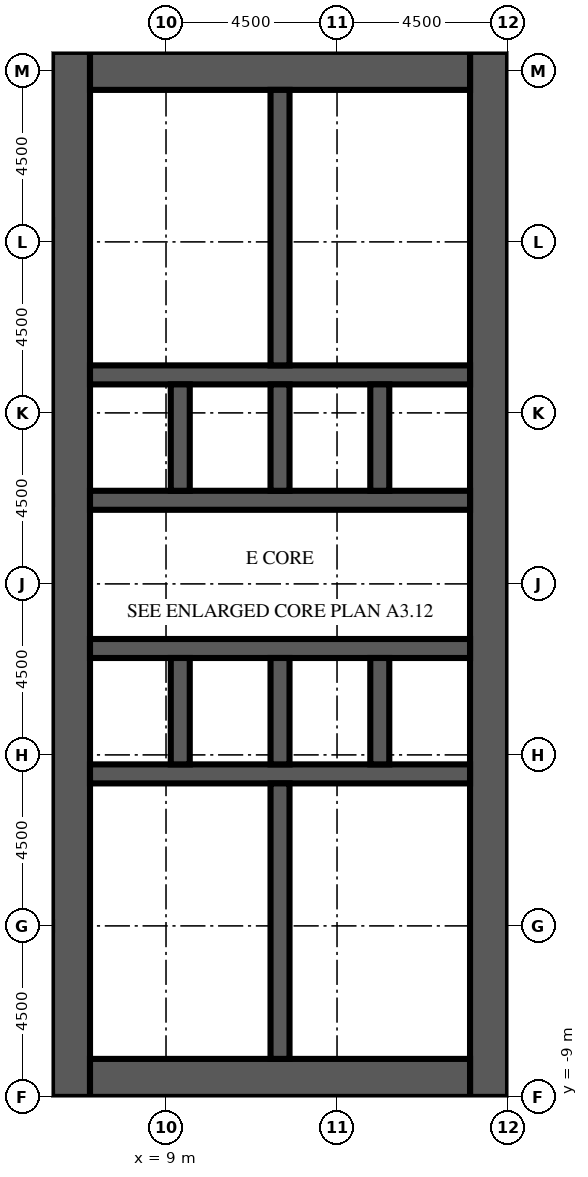
"""IFC4 building model, lengths in metres.
Left out: names, types, materials, properties, quantities, classifications, styles, units other than length and angle.
Written with IfcOpenShell. Run it as: python <this file> out.ifc"""

import sys

from ifc_helpers import new_model, si_unit, direction, frame, frame_2d, origin, place, context, subcontext, project, spatial, rectangle, extrude, element, fill, save


model = new_model("IFC4")
c1 = context("Model", 3, precision=1e-05, world=origin(), true_north=direction((0.0, 1.0)))
c2 = subcontext(c1, "Body", "Model", "MODEL_VIEW")
j1 = project(units=[si_unit("LENGTHUNIT", "METRE"), si_unit("PLANEANGLEUNIT", "RADIAN")], contexts=[c1])
p1 = place(None, origin())
s1 = spatial("IfcSite", under=j1, at=p1, CompositionType="ELEMENT")
p2 = place(p1, origin())
s2 = spatial("IfcBuilding", under=s1, at=p2, CompositionType="ELEMENT")
p3 = place(p2, frame((0.0, 0.0, 70.6)))
s3 = spatial("IfcBuildingStorey", under=s2, at=p3, CompositionType="ELEMENT", Elevation=70.6)
p4 = place(p3, frame((6.5, -9.0, 0.0), z_axis=(0.0, 0.0, 1.0), x_axis=(0.0, 1.0, 0.0)))
e1 = element("IfcWall", 1, at=p4, inside=s3, PredefinedType="SHEAR", context=c2, shape_type="SweptSolid", body=[
    extrude(rectangle(XDim=27.5, YDim=1.0, at=frame_2d((13.75, 0.0))), origin(), (0.0, 0.0, 1.0), 6.0),
])
p5 = place(p4, frame((12.55, 0.0, 0.0)))
e2 = element("IfcOpeningElement", 2, at=p5, cuts=e1, PredefinedType="OPENING", context=c2, shape_type="SweptSolid", body=[
    extrude(rectangle(XDim=2.4, YDim=2.4, at=frame_2d((1.2, 1.2))), frame((0.0, 0.51, 0.0), z_axis=(0.0, -1.0, 0.0), x_axis=(1.0, 0.0, 0.0)), (0.0, 0.0, 1.0), 1.02),
])
p6 = place(p4, frame((5.475, 0.0, 0.0)))
e3 = element("IfcOpeningElement", 3, at=p6, cuts=e1, PredefinedType="OPENING", context=c2, shape_type="SweptSolid", body=[
    extrude(rectangle(XDim=1.2, YDim=2.1, at=frame_2d((0.6, 1.05))), frame((0.0, 0.51, 0.0), z_axis=(0.0, -1.0, 0.0), x_axis=(1.0, 0.0, 0.0)), (0.0, 0.0, 1.0), 1.02),
])
p7 = place(p4, frame((19.475, 0.0, 0.0)))
e4 = element("IfcOpeningElement", 4, at=p7, cuts=e1, PredefinedType="OPENING", context=c2, shape_type="SweptSolid", body=[
    extrude(rectangle(XDim=1.0, YDim=2.1, at=frame_2d((0.5, 1.05))), frame((0.0, 0.51, 0.0), z_axis=(0.0, -1.0, 0.0), x_axis=(1.0, 0.0, 0.0)), (0.0, 0.0, 1.0), 1.02),
])
p8 = place(p4, frame((21.106, 0.0, 0.0)))
e5 = element("IfcOpeningElement", 5, at=p8, cuts=e1, PredefinedType="OPENING", context=c2, shape_type="SweptSolid", body=[
    extrude(rectangle(XDim=1.0, YDim=2.1, at=frame_2d((0.5, 1.05))), frame((0.0, 0.51, 0.0), z_axis=(0.0, -1.0, 0.0), x_axis=(1.0, 0.0, 0.0)), (0.0, 0.0, 1.0), 1.02),
])
p9 = place(p4, frame((23.1, 0.0, 0.0)))
e6 = element("IfcOpeningElement", 6, at=p9, cuts=e1, PredefinedType="OPENING", context=c2, shape_type="SweptSolid", body=[
    extrude(rectangle(XDim=1.0, YDim=2.1, at=frame_2d((0.5, 1.05))), frame((0.0, 0.51, 0.0), z_axis=(0.0, -1.0, 0.0), x_axis=(1.0, 0.0, 0.0)), (0.0, 0.0, 1.0), 1.02),
])
p10 = place(p4, frame((25.094, 0.0, 0.0)))
e7 = element("IfcOpeningElement", 7, at=p10, cuts=e1, PredefinedType="OPENING", context=c2, shape_type="SweptSolid", body=[
    extrude(rectangle(XDim=1.0, YDim=2.1, at=frame_2d((0.5, 1.05))), frame((0.0, 0.51, 0.0), z_axis=(0.0, -1.0, 0.0), x_axis=(1.0, 0.0, 0.0)), (0.0, 0.0, 1.0), 1.02),
])
p11 = place(p3, frame((17.5, -9.0, 0.0), z_axis=(0.0, 0.0, 1.0), x_axis=(0.0, 1.0, 0.0)))
e8 = element("IfcWall", 8, at=p11, inside=s3, PredefinedType="SHEAR", context=c2, shape_type="SweptSolid", body=[
    extrude(rectangle(XDim=27.5, YDim=1.0, at=frame_2d((13.75, 0.0))), origin(), (0.0, 0.0, 1.0), 6.0),
])
p12 = place(p11, frame((12.55, 0.0, 0.0)))
e9 = element("IfcOpeningElement", 9, at=p12, cuts=e8, PredefinedType="OPENING", context=c2, shape_type="SweptSolid", body=[
    extrude(rectangle(XDim=2.4, YDim=2.4, at=frame_2d((1.2, 1.2))), frame((0.0, 0.51, 0.0), z_axis=(0.0, -1.0, 0.0), x_axis=(1.0, 0.0, 0.0)), (0.0, 0.0, 1.0), 1.02),
])
p13 = place(p11, frame((6.825, 0.0, 0.0)))
e10 = element("IfcOpeningElement", 10, at=p13, cuts=e8, PredefinedType="OPENING", context=c2, shape_type="SweptSolid", body=[
    extrude(rectangle(XDim=1.2, YDim=2.1, at=frame_2d((0.6, 1.05))), frame((0.0, 0.51, 0.0), z_axis=(0.0, -1.0, 0.0), x_axis=(1.0, 0.0, 0.0)), (0.0, 0.0, 1.0), 1.02),
])
p14 = place(p11, frame((19.475, 0.0, 0.0)))
e11 = element("IfcOpeningElement", 11, at=p14, cuts=e8, PredefinedType="OPENING", context=c2, shape_type="SweptSolid", body=[
    extrude(rectangle(XDim=1.2, YDim=2.1, at=frame_2d((0.6, 1.05))), frame((0.0, 0.51, 0.0), z_axis=(0.0, -1.0, 0.0), x_axis=(1.0, 0.0, 0.0)), (0.0, 0.0, 1.0), 1.02),
])
for number, where, z_axis, x_axis in (
    (12, (7.0, -8.5, 0.0), (0.0, 0.0, 1.0), (1.0, 0.0, 0.0)),
    (13, (7.0, 18.0, 0.0), (0.0, 0.0, 1.0), (1.0, 0.0, 0.0)),
):
    element("IfcWall", number, at=place(p3, frame(where, z_axis=z_axis, x_axis=x_axis)), inside=s3, PredefinedType="SHEAR", context=c2, shape_type="SweptSolid", body=[
        extrude(rectangle(XDim=10.0, YDim=1.0, at=frame_2d((5.0, 0.0))), origin(), (0.0, 0.0, 1.0), 6.0),
    ])
p15 = place(p3, frame((7.0, -0.5, 0.0), z_axis=(0.0, 0.0, 1.0), x_axis=(1.0, 0.0, 0.0)))
e14 = element("IfcWall", 14, at=p15, inside=s3, PredefinedType="SHEAR", context=c2, shape_type="SweptSolid", body=[
    extrude(rectangle(XDim=10.0, YDim=0.5, at=frame_2d((5.0, 0.0))), origin(), (0.0, 0.0, 1.0), 6.0),
])
p16 = place(p3, frame((7.0, 2.8, 0.0), z_axis=(0.0, 0.0, 1.0), x_axis=(1.0, 0.0, 0.0)))
e15 = element("IfcWall", 15, at=p16, inside=s3, PredefinedType="SHEAR", context=c2, shape_type="SweptSolid", body=[
    extrude(rectangle(XDim=10.0, YDim=0.5, at=frame_2d((5.0, 0.0))), origin(), (0.0, 0.0, 1.0), 6.0),
])
p17 = place(p16, frame((0.512, 0.0, 0.0)))
e16 = element("IfcOpeningElement", 16, at=p17, cuts=e15, PredefinedType="OPENING", context=c2, shape_type="SweptSolid", body=[
    extrude(rectangle(XDim=1.1, YDim=2.1, at=frame_2d((0.55, 1.05))), frame((0.0, 0.26, 0.0), z_axis=(0.0, -1.0, 0.0), x_axis=(1.0, 0.0, 0.0)), (0.0, 0.0, 1.0), 0.52),
])
p18 = place(p16, frame((3.137, 0.0, 0.0)))
e17 = element("IfcOpeningElement", 17, at=p18, cuts=e15, PredefinedType="OPENING", context=c2, shape_type="SweptSolid", body=[
    extrude(rectangle(XDim=1.1, YDim=2.1, at=frame_2d((0.55, 1.05))), frame((0.0, 0.26, 0.0), z_axis=(0.0, -1.0, 0.0), x_axis=(1.0, 0.0, 0.0)), (0.0, 0.0, 1.0), 0.52),
])
p19 = place(p16, frame((8.387, 0.0, 0.0)))
e18 = element("IfcOpeningElement", 18, at=p19, cuts=e15, PredefinedType="OPENING", context=c2, shape_type="SweptSolid", body=[
    extrude(rectangle(XDim=1.1, YDim=2.1, at=frame_2d((0.55, 1.05))), frame((0.0, 0.26, 0.0), z_axis=(0.0, -1.0, 0.0), x_axis=(1.0, 0.0, 0.0)), (0.0, 0.0, 1.0), 0.52),
])
p20 = place(p3, frame((7.0, 6.7, 0.0), z_axis=(0.0, 0.0, 1.0), x_axis=(1.0, 0.0, 0.0)))
e19 = element("IfcWall", 19, at=p20, inside=s3, PredefinedType="SHEAR", context=c2, shape_type="SweptSolid", body=[
    extrude(rectangle(XDim=10.0, YDim=0.5, at=frame_2d((5.0, 0.0))), origin(), (0.0, 0.0, 1.0), 6.0),
])
p21 = place(p20, frame((0.512, 0.0, 0.0)))
e20 = element("IfcOpeningElement", 20, at=p21, cuts=e19, PredefinedType="OPENING", context=c2, shape_type="SweptSolid", body=[
    extrude(rectangle(XDim=1.1, YDim=2.1, at=frame_2d((0.55, 1.05))), frame((0.0, 0.26, 0.0), z_axis=(0.0, -1.0, 0.0), x_axis=(1.0, 0.0, 0.0)), (0.0, 0.0, 1.0), 0.52),
])
p22 = place(p20, frame((3.188, 0.0, 0.0)))
e21 = element("IfcOpeningElement", 21, at=p22, cuts=e19, PredefinedType="OPENING", context=c2, shape_type="SweptSolid", body=[
    extrude(rectangle(XDim=1.0, YDim=2.1, at=frame_2d((0.5, 1.05))), frame((0.0, 0.26, 0.0), z_axis=(0.0, -1.0, 0.0), x_axis=(1.0, 0.0, 0.0)), (0.0, 0.0, 1.0), 0.52),
])
p23 = place(p20, frame((5.812, 0.0, 0.0)))
e22 = element("IfcOpeningElement", 22, at=p23, cuts=e19, PredefinedType="OPENING", context=c2, shape_type="SweptSolid", body=[
    extrude(rectangle(XDim=1.0, YDim=2.1, at=frame_2d((0.5, 1.05))), frame((0.0, 0.26, 0.0), z_axis=(0.0, -1.0, 0.0), x_axis=(1.0, 0.0, 0.0)), (0.0, 0.0, 1.0), 0.52),
])
p24 = place(p20, frame((8.438, 0.0, 0.0)))
e23 = element("IfcOpeningElement", 23, at=p24, cuts=e19, PredefinedType="OPENING", context=c2, shape_type="SweptSolid", body=[
    extrude(rectangle(XDim=1.0, YDim=2.1, at=frame_2d((0.5, 1.05))), frame((0.0, 0.26, 0.0), z_axis=(0.0, -1.0, 0.0), x_axis=(1.0, 0.0, 0.0)), (0.0, 0.0, 1.0), 0.52),
])
p25 = place(p3, frame((7.0, 10.0, 0.0), z_axis=(0.0, 0.0, 1.0), x_axis=(1.0, 0.0, 0.0)))
e24 = element("IfcWall", 24, at=p25, inside=s3, PredefinedType="SHEAR", context=c2, shape_type="SweptSolid", body=[
    extrude(rectangle(XDim=10.0, YDim=0.5, at=frame_2d((5.0, 0.0))), origin(), (0.0, 0.0, 1.0), 6.0),
])
for number, where, z_axis, x_axis in (
    (25, (9.375, -0.25, 0.0), (0.0, 0.0, 1.0), (0.0, 1.0, 0.0)),
    (26, (9.375, 6.95, 0.0), (0.0, 0.0, 1.0), (0.0, 1.0, 0.0)),
    (27, (12.0, -0.25, 0.0), (0.0, 0.0, 1.0), (0.0, 1.0, 0.0)),
    (28, (12.0, 6.95, 0.0), (0.0, 0.0, 1.0), (0.0, 1.0, 0.0)),
    (29, (14.625, -0.25, 0.0), (0.0, 0.0, 1.0), (0.0, 1.0, 0.0)),
    (30, (14.625, 6.95, 0.0), (0.0, 0.0, 1.0), (0.0, 1.0, 0.0)),
):
    element("IfcWall", number, at=place(p3, frame(where, z_axis=z_axis, x_axis=x_axis)), inside=s3, PredefinedType="SHEAR", context=c2, shape_type="SweptSolid", body=[
        extrude(rectangle(XDim=2.8, YDim=0.5, at=frame_2d((1.4, 0.0))), origin(), (0.0, 0.0, 1.0), 6.0),
    ])
for number, where, z_axis, x_axis in (
    (31, (12.0, -8.0, 0.0), (0.0, 0.0, 1.0), (0.0, 1.0, 0.0)),
    (32, (12.0, 10.25, 0.0), (0.0, 0.0, 1.0), (0.0, 1.0, 0.0)),
):
    element("IfcWall", number, at=place(p3, frame(where, z_axis=z_axis, x_axis=x_axis)), inside=s3, PredefinedType="SHEAR", context=c2, shape_type="SweptSolid", body=[
        extrude(rectangle(XDim=7.25, YDim=0.5, at=frame_2d((3.625, 0.0))), origin(), (0.0, 0.0, 1.0), 6.0),
    ])
p26 = place(p3, frame((7.0, -5.1, 0.0), z_axis=(0.0, 0.0, 1.0), x_axis=(1.0, 0.0, 0.0)))
e33 = element("IfcWall", 33, at=p26, inside=s3, PredefinedType="PARTITIONING", context=c2, shape_type="SweptSolid", body=[
    extrude(rectangle(XDim=1.5, YDim=0.1, at=frame_2d((0.75, 0.0))), origin(), (0.0, 0.0, 1.0), 5.4),
])
p27 = place(p26, frame((0.25, 0.0, 0.0)))
e34 = element("IfcOpeningElement", 34, at=p27, cuts=e33, PredefinedType="OPENING", context=c2, shape_type="SweptSolid", body=[
    extrude(rectangle(XDim=1.0, YDim=2.1, at=frame_2d((0.5, 1.05))), frame((0.0, 0.06, 0.0), z_axis=(0.0, -1.0, 0.0), x_axis=(1.0, 0.0, 0.0)), (0.0, 0.0, 1.0), 0.12),
])
p28 = place(p3, frame((8.5, -5.1, 0.0), z_axis=(0.0, 0.0, 1.0), x_axis=(0.0, 1.0, 0.0)))
e35 = element("IfcWall", 35, at=p28, inside=s3, PredefinedType="PARTITIONING", context=c2, shape_type="SweptSolid", body=[
    extrude(rectangle(XDim=2.175, YDim=0.1, at=frame_2d((1.087, 0.0))), origin(), (0.0, 0.0, 1.0), 5.4),
])
p29 = place(p28, frame((0.587, 0.0, 0.0)))
e36 = element("IfcOpeningElement", 36, at=p29, cuts=e35, PredefinedType="OPENING", context=c2, shape_type="SweptSolid", body=[
    extrude(rectangle(XDim=1.0, YDim=2.1, at=frame_2d((0.5, 1.05))), frame((0.0, 0.06, 0.0), z_axis=(0.0, -1.0, 0.0), x_axis=(1.0, 0.0, 0.0)), (0.0, 0.0, 1.0), 0.12),
])
p30 = place(p3, frame((8.5, -2.925, 0.0), z_axis=(0.0, 0.0, 1.0), x_axis=(0.0, 1.0, 0.0)))
e37 = element("IfcWall", 37, at=p30, inside=s3, PredefinedType="PARTITIONING", context=c2, shape_type="SweptSolid", body=[
    extrude(rectangle(XDim=2.175, YDim=0.1, at=frame_2d((1.087, 0.0))), origin(), (0.0, 0.0, 1.0), 5.4),
])
p31 = place(p30, frame((0.587, 0.0, 0.0)))
e38 = element("IfcOpeningElement", 38, at=p31, cuts=e37, PredefinedType="OPENING", context=c2, shape_type="SweptSolid", body=[
    extrude(rectangle(XDim=1.0, YDim=2.1, at=frame_2d((0.5, 1.05))), frame((0.0, 0.06, 0.0), z_axis=(0.0, -1.0, 0.0), x_axis=(1.0, 0.0, 0.0)), (0.0, 0.0, 1.0), 0.12),
])
for number, where, z_axis, x_axis in (
    (39, (8.5, -5.1, 0.0), (0.0, 0.0, 1.0), (1.0, 0.0, 0.0)),
    (40, (8.5, -2.925, 0.0), (0.0, 0.0, 1.0), (1.0, 0.0, 0.0)),
):
    element("IfcWall", number, at=place(p3, frame(where, z_axis=z_axis, x_axis=x_axis)), inside=s3, PredefinedType="PARTITIONING", context=c2, shape_type="SweptSolid", body=[
        extrude(rectangle(XDim=3.25, YDim=0.1, at=frame_2d((1.625, 0.0))), origin(), (0.0, 0.0, 1.0), 5.4),
    ])
for number, where, z_axis, x_axis in (
    (41, (7.0, 11.7, 0.0), (0.0, 0.0, 1.0), (1.0, 0.0, 0.0)),
    (42, (7.0, 13.512, 0.0), (0.0, 0.0, 1.0), (1.0, 0.0, 0.0)),
    (43, (7.0, 15.688, 0.0), (0.0, 0.0, 1.0), (1.0, 0.0, 0.0)),
):
    element("IfcWall", number, at=place(p3, frame(where, z_axis=z_axis, x_axis=x_axis)), inside=s3, PredefinedType="PARTITIONING", context=c2, shape_type="SweptSolid", body=[
        extrude(rectangle(XDim=4.75, YDim=0.1, at=frame_2d((2.375, 0.0))), origin(), (0.0, 0.0, 1.0), 5.4),
    ])
p32 = place(p17, origin())
e44 = element("IfcDoor", 44, at=p32, inside=s3, OperationType="DOUBLE_DOOR_SLIDING", PredefinedType="DOOR", context=c2, shape_type="SweptSolid", body=[
    extrude(rectangle(XDim=1.1, YDim=2.1, at=frame_2d((0.55, 1.05))), frame((0.0, 0.025, 0.0), z_axis=(0.0, -1.0, 0.0), x_axis=(1.0, 0.0, 0.0)), (0.0, 0.0, 1.0), 0.05),
])
fill(e16, e44)
p33 = place(p18, origin())
e45 = element("IfcDoor", 45, at=p33, inside=s3, OperationType="DOUBLE_DOOR_SLIDING", PredefinedType="DOOR", context=c2, shape_type="SweptSolid", body=[
    extrude(rectangle(XDim=1.1, YDim=2.1, at=frame_2d((0.55, 1.05))), frame((0.0, 0.025, 0.0), z_axis=(0.0, -1.0, 0.0), x_axis=(1.0, 0.0, 0.0)), (0.0, 0.0, 1.0), 0.05),
])
fill(e17, e45)
p34 = place(p19, origin())
e46 = element("IfcDoor", 46, at=p34, inside=s3, OperationType="DOUBLE_DOOR_SLIDING", PredefinedType="DOOR", context=c2, shape_type="SweptSolid", body=[
    extrude(rectangle(XDim=1.1, YDim=2.1, at=frame_2d((0.55, 1.05))), frame((0.0, 0.025, 0.0), z_axis=(0.0, -1.0, 0.0), x_axis=(1.0, 0.0, 0.0)), (0.0, 0.0, 1.0), 0.05),
])
fill(e18, e46)
p35 = place(p21, origin())
e47 = element("IfcDoor", 47, at=p35, inside=s3, OperationType="DOUBLE_DOOR_SLIDING", PredefinedType="DOOR", context=c2, shape_type="SweptSolid", body=[
    extrude(rectangle(XDim=1.1, YDim=2.1, at=frame_2d((0.55, 1.05))), frame((0.0, 0.025, 0.0), z_axis=(0.0, -1.0, 0.0), x_axis=(1.0, 0.0, 0.0)), (0.0, 0.0, 1.0), 0.05),
])
fill(e20, e47)
p36 = place(p5, origin())
e48 = element("IfcDoor", 48, at=p36, inside=s3, OperationType="DOUBLE_DOOR_DOUBLE_SWING", PredefinedType="DOOR", context=c2, shape_type="SweptSolid", body=[
    extrude(rectangle(XDim=2.4, YDim=2.4, at=frame_2d((1.2, 1.2))), frame((0.0, 0.025, 0.0), z_axis=(0.0, -1.0, 0.0), x_axis=(1.0, 0.0, 0.0)), (0.0, 0.0, 1.0), 0.05),
])
fill(e2, e48)
p37 = place(p12, origin())
e49 = element("IfcDoor", 49, at=p37, inside=s3, OperationType="DOUBLE_DOOR_DOUBLE_SWING", PredefinedType="DOOR", context=c2, shape_type="SweptSolid", body=[
    extrude(rectangle(XDim=2.4, YDim=2.4, at=frame_2d((1.2, 1.2))), frame((0.0, 0.025, 0.0), z_axis=(0.0, -1.0, 0.0), x_axis=(1.0, 0.0, 0.0)), (0.0, 0.0, 1.0), 0.05),
])
fill(e9, e49)
p38 = place(p13, frame((1.2, 0.0, 0.0), z_axis=(0.0, 0.0, 1.0), x_axis=(-1.0, 0.0, 0.0)))
e50 = element("IfcDoor", 50, at=p38, inside=s3, OperationType="SINGLE_SWING_LEFT", PredefinedType="DOOR", context=c2, shape_type="SweptSolid", body=[
    extrude(rectangle(XDim=1.2, YDim=2.1, at=frame_2d((0.6, 1.05))), frame((0.0, 0.025, 0.0), z_axis=(0.0, -1.0, 0.0), x_axis=(1.0, 0.0, 0.0)), (0.0, 0.0, 1.0), 0.05),
])
fill(e10, e50)
p39 = place(p14, frame((1.2, 0.0, 0.0), z_axis=(0.0, 0.0, 1.0), x_axis=(-1.0, 0.0, 0.0)))
e51 = element("IfcDoor", 51, at=p39, inside=s3, OperationType="SINGLE_SWING_LEFT", PredefinedType="DOOR", context=c2, shape_type="SweptSolid", body=[
    extrude(rectangle(XDim=1.2, YDim=2.1, at=frame_2d((0.6, 1.05))), frame((0.0, 0.025, 0.0), z_axis=(0.0, -1.0, 0.0), x_axis=(1.0, 0.0, 0.0)), (0.0, 0.0, 1.0), 0.05),
])
fill(e11, e51)
p40 = place(p22, origin())
e52 = element("IfcDoor", 52, at=p40, inside=s3, OperationType="SINGLE_SWING_RIGHT", PredefinedType="DOOR", context=c2, shape_type="SweptSolid", body=[
    extrude(rectangle(XDim=1.0, YDim=2.1, at=frame_2d((0.5, 1.05))), frame((0.0, 0.025, 0.0), z_axis=(0.0, -1.0, 0.0), x_axis=(1.0, 0.0, 0.0)), (0.0, 0.0, 1.0), 0.05),
])
fill(e21, e52)
p41 = place(p23, origin())
e53 = element("IfcDoor", 53, at=p41, inside=s3, OperationType="SINGLE_SWING_LEFT", PredefinedType="DOOR", context=c2, shape_type="SweptSolid", body=[
    extrude(rectangle(XDim=1.0, YDim=2.1, at=frame_2d((0.5, 1.05))), frame((0.0, 0.025, 0.0), z_axis=(0.0, -1.0, 0.0), x_axis=(1.0, 0.0, 0.0)), (0.0, 0.0, 1.0), 0.05),
])
fill(e22, e53)
p42 = place(p24, origin())
e54 = element("IfcDoor", 54, at=p42, inside=s3, OperationType="SINGLE_SWING_RIGHT", PredefinedType="DOOR", context=c2, shape_type="SweptSolid", body=[
    extrude(rectangle(XDim=1.0, YDim=2.1, at=frame_2d((0.5, 1.05))), frame((0.0, 0.025, 0.0), z_axis=(0.0, -1.0, 0.0), x_axis=(1.0, 0.0, 0.0)), (0.0, 0.0, 1.0), 0.05),
])
fill(e23, e54)
p43 = place(p6, origin())
e55 = element("IfcDoor", 55, at=p43, inside=s3, OperationType="SINGLE_SWING_RIGHT", PredefinedType="DOOR", context=c2, shape_type="SweptSolid", body=[
    extrude(rectangle(XDim=1.2, YDim=2.1, at=frame_2d((0.6, 1.05))), frame((0.0, -0.425, 0.0), z_axis=(0.0, -1.0, 0.0), x_axis=(1.0, 0.0, 0.0)), (0.0, 0.0, 1.0), 0.05),
])
fill(e3, e55)
p44 = place(p27, origin())
e56 = element("IfcDoor", 56, at=p44, inside=s3, OperationType="SINGLE_SWING_LEFT", PredefinedType="DOOR", context=c2, shape_type="SweptSolid", body=[
    extrude(rectangle(XDim=1.0, YDim=2.1, at=frame_2d((0.5, 1.05))), frame((0.0, 0.025, 0.0), z_axis=(0.0, -1.0, 0.0), x_axis=(1.0, 0.0, 0.0)), (0.0, 0.0, 1.0), 0.05),
])
fill(e34, e56)
p45 = place(p29, origin())
e57 = element("IfcDoor", 57, at=p45, inside=s3, OperationType="SINGLE_SWING_RIGHT", PredefinedType="DOOR", context=c2, shape_type="SweptSolid", body=[
    extrude(rectangle(XDim=1.0, YDim=2.1, at=frame_2d((0.5, 1.05))), frame((0.0, 0.025, 0.0), z_axis=(0.0, -1.0, 0.0), x_axis=(1.0, 0.0, 0.0)), (0.0, 0.0, 1.0), 0.05),
])
fill(e36, e57)
p46 = place(p31, origin())
e58 = element("IfcDoor", 58, at=p46, inside=s3, OperationType="SINGLE_SWING_LEFT", PredefinedType="DOOR", context=c2, shape_type="SweptSolid", body=[
    extrude(rectangle(XDim=1.0, YDim=2.1, at=frame_2d((0.5, 1.05))), frame((0.0, 0.025, 0.0), z_axis=(0.0, -1.0, 0.0), x_axis=(1.0, 0.0, 0.0)), (0.0, 0.0, 1.0), 0.05),
])
fill(e38, e58)
p47 = place(p7, origin())
e59 = element("IfcDoor", 59, at=p47, inside=s3, OperationType="SINGLE_SWING_RIGHT", PredefinedType="DOOR", context=c2, shape_type="SweptSolid", body=[
    extrude(rectangle(XDim=1.0, YDim=2.1, at=frame_2d((0.5, 1.05))), frame((0.0, -0.425, 0.0), z_axis=(0.0, -1.0, 0.0), x_axis=(1.0, 0.0, 0.0)), (0.0, 0.0, 1.0), 0.05),
])
fill(e4, e59)
p48 = place(p8, origin())
e60 = element("IfcDoor", 60, at=p48, inside=s3, OperationType="SINGLE_SWING_LEFT", PredefinedType="DOOR", context=c2, shape_type="SweptSolid", body=[
    extrude(rectangle(XDim=1.0, YDim=2.1, at=frame_2d((0.5, 1.05))), frame((0.0, -0.425, 0.0), z_axis=(0.0, -1.0, 0.0), x_axis=(1.0, 0.0, 0.0)), (0.0, 0.0, 1.0), 0.05),
])
fill(e5, e60)
p49 = place(p9, origin())
e61 = element("IfcDoor", 61, at=p49, inside=s3, OperationType="SINGLE_SWING_RIGHT", PredefinedType="DOOR", context=c2, shape_type="SweptSolid", body=[
    extrude(rectangle(XDim=1.0, YDim=2.1, at=frame_2d((0.5, 1.05))), frame((0.0, -0.425, 0.0), z_axis=(0.0, -1.0, 0.0), x_axis=(1.0, 0.0, 0.0)), (0.0, 0.0, 1.0), 0.05),
])
fill(e6, e61)
p50 = place(p10, origin())
e62 = element("IfcDoor", 62, at=p50, inside=s3, OperationType="SINGLE_SWING_LEFT", PredefinedType="DOOR", context=c2, shape_type="SweptSolid", body=[
    extrude(rectangle(XDim=1.0, YDim=2.1, at=frame_2d((0.5, 1.05))), frame((0.0, -0.425, 0.0), z_axis=(0.0, -1.0, 0.0), x_axis=(1.0, 0.0, 0.0)), (0.0, 0.0, 1.0), 0.05),
])
fill(e7, e62)
save(model, sys.argv[1])
